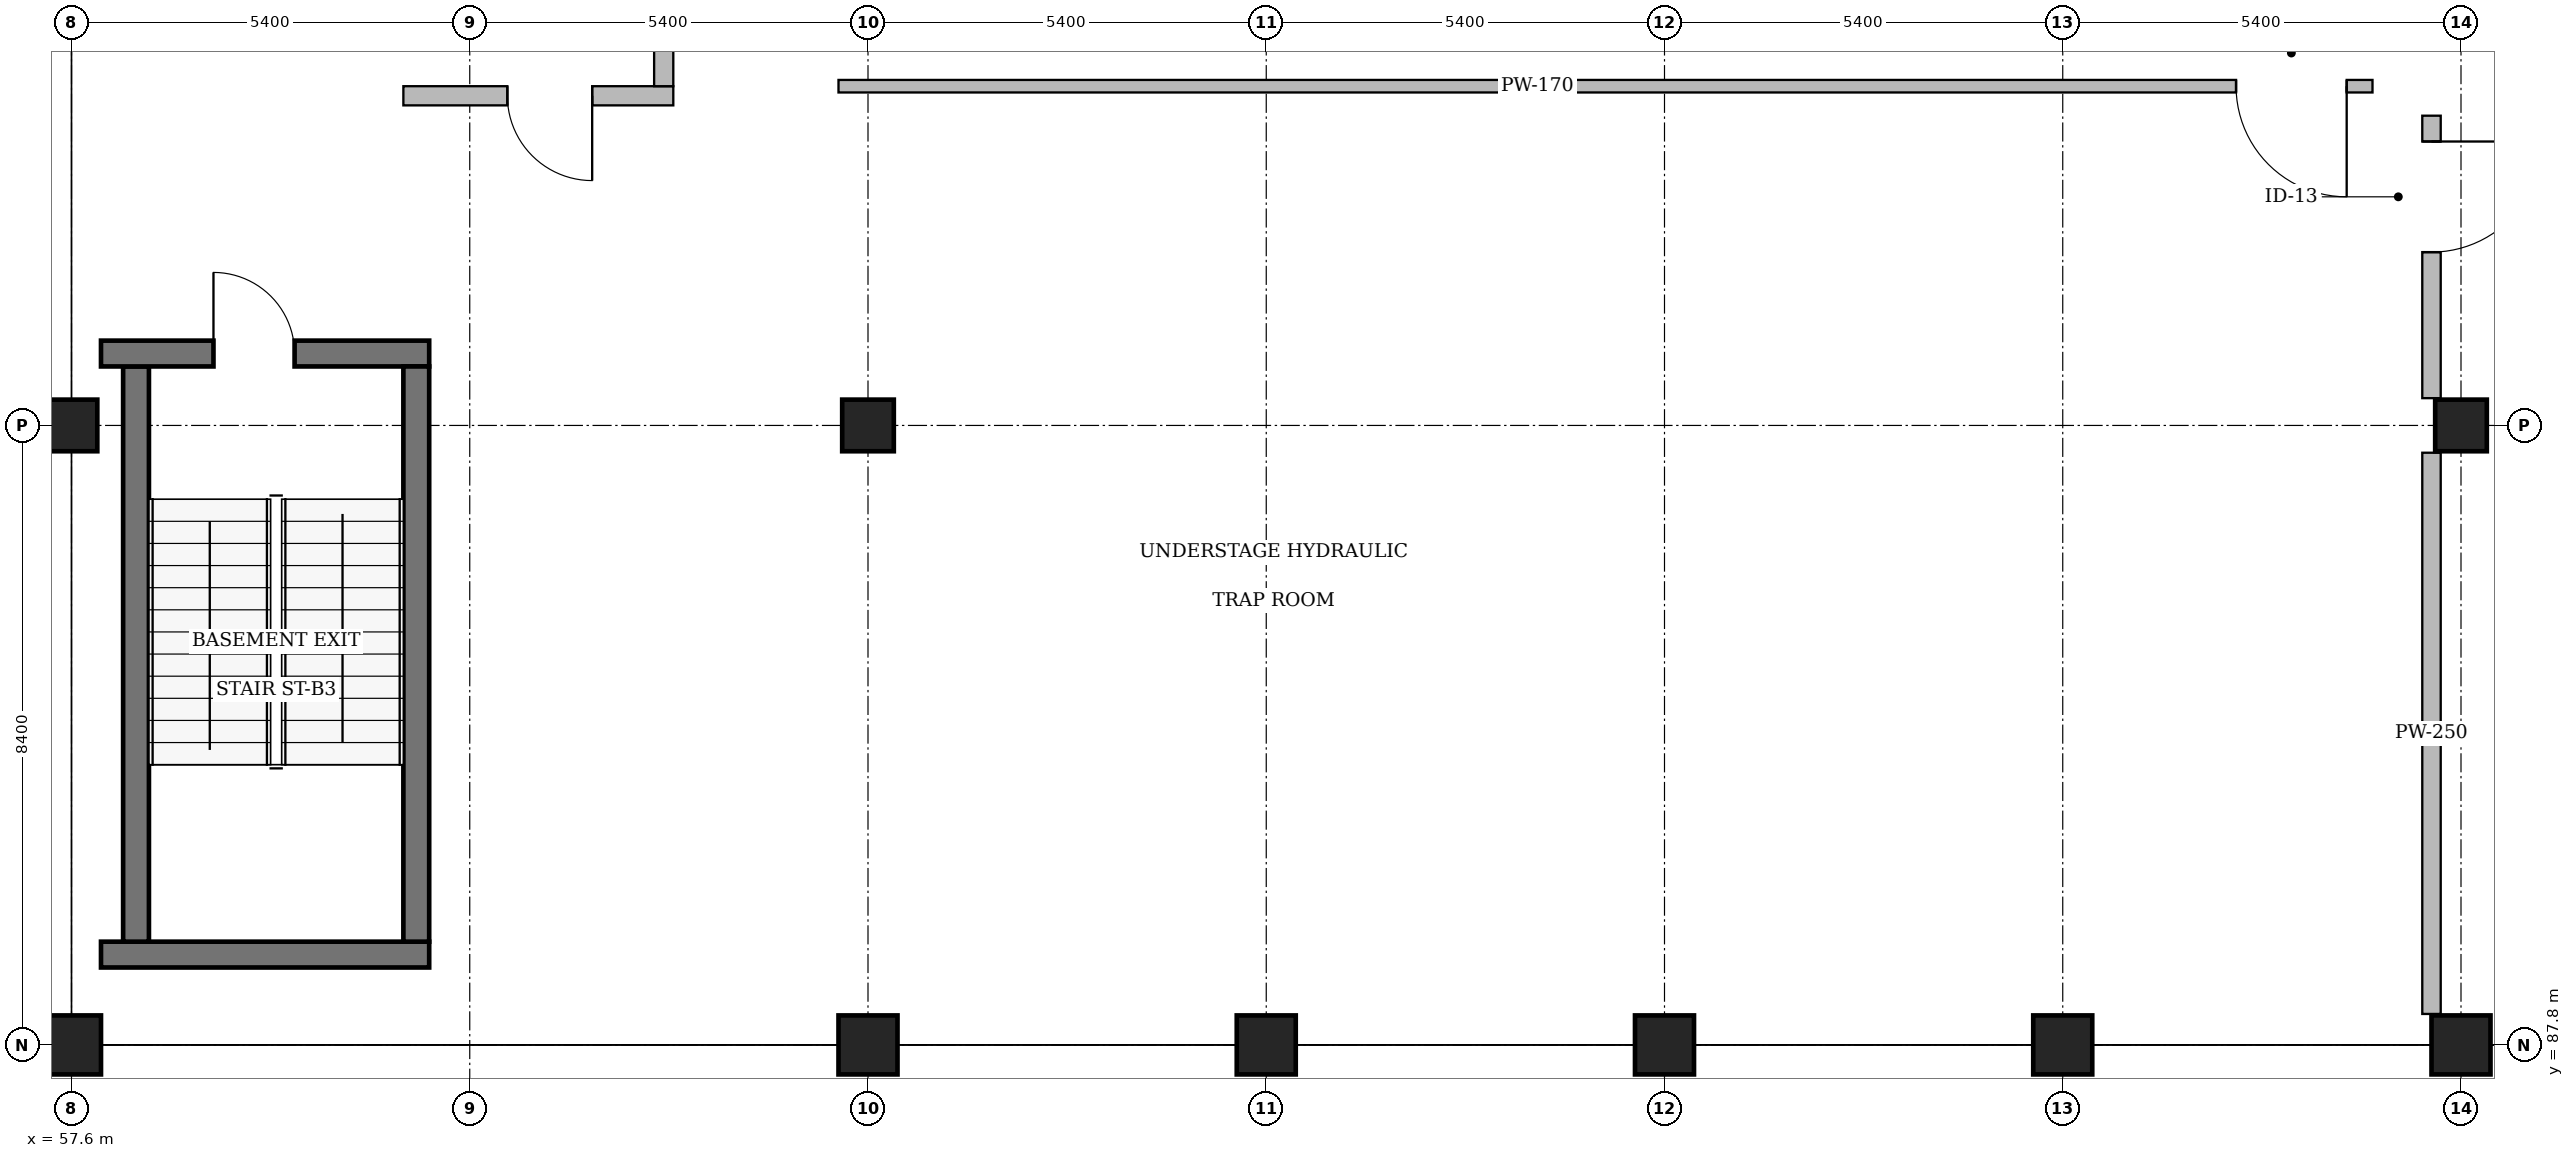
"""IFC4 building model, lengths in metres.
Left out: names, types, materials, properties, quantities, classifications, styles, units other than length and angle.
Written with IfcOpenShell. Run it as: python <this file> out.ifc"""

import sys

from ifc_helpers import new_model, si_unit, direction, frame, frame_2d, origin, origin_2d, place, context, subcontext, project, spatial, rectangle, extrude, element, fill, save


model = new_model("IFC4")
c1 = context("Model", 3, precision=1e-05, world=origin(), true_north=direction((0.0, 1.0)))
c2 = subcontext(c1, "Body", "Model", "MODEL_VIEW")
j1 = project(units=[si_unit("LENGTHUNIT", "METRE"), si_unit("PLANEANGLEUNIT", "RADIAN")], contexts=[c1])
p1 = place(None, origin())
s1 = spatial("IfcSite", under=j1, at=p1, CompositionType="ELEMENT")
p2 = place(p1, origin())
s2 = spatial("IfcBuilding", under=s1, at=p2, CompositionType="ELEMENT")
p3 = place(p2, frame((0.0, 0.0, -4.8)))
s3 = spatial("IfcBuildingStorey", under=s2, at=p3, CompositionType="ELEMENT", Elevation=-4.8)
p4 = place(p3, frame((68.4, 87.8, 0.0), z_axis=(0.0, 0.0, 1.0), x_axis=(1.0, 0.0, 0.0)))
e1 = element("IfcColumn", 1, at=p4, inside=s3, PredefinedType="COLUMN", context=c2, shape_type="SweptSolid", body=[
    extrude(rectangle(XDim=0.8, YDim=0.8, at=origin_2d()), origin(), (0.0, 0.0, 1.0), 4.8),
])
p5 = place(p3, frame((68.4, 96.2, 0.0), z_axis=(0.0, 0.0, 1.0), x_axis=(1.0, 0.0, 0.0)))
e2 = element("IfcColumn", 2, at=p5, inside=s3, PredefinedType="COLUMN", context=c2, shape_type="SweptSolid", body=[
    extrude(rectangle(XDim=0.7, YDim=0.7, at=origin_2d()), origin(), (0.0, 0.0, 1.0), 4.8),
])
for number, where, z_axis, x_axis in (
    (3, (73.8, 87.8, 0.0), (0.0, 0.0, 1.0), (1.0, 0.0, 0.0)),
    (4, (79.2, 87.8, 0.0), (0.0, 0.0, 1.0), (1.0, 0.0, 0.0)),
    (5, (84.6, 87.8, 0.0), (0.0, 0.0, 1.0), (1.0, 0.0, 0.0)),
    (6, (90.0, 87.8, 0.0), (0.0, 0.0, 1.0), (1.0, 0.0, 0.0)),
):
    element("IfcColumn", number, at=place(p3, frame(where, z_axis=z_axis, x_axis=x_axis)), inside=s3, PredefinedType="COLUMN", context=c2, shape_type="SweptSolid", body=[
        extrude(rectangle(XDim=0.8, YDim=0.8, at=origin_2d()), origin(), (0.0, 0.0, 1.0), 4.8),
    ])
p6 = place(p3, frame((90.0, 96.2, 0.0), z_axis=(0.0, 0.0, 1.0), x_axis=(1.0, 0.0, 0.0)))
e7 = element("IfcColumn", 7, at=p6, inside=s3, PredefinedType="COLUMN", context=c2, shape_type="SweptSolid", body=[
    extrude(rectangle(XDim=0.7, YDim=0.7, at=origin_2d()), origin(), (0.0, 0.0, 1.0), 4.8),
])
p7 = place(p3, frame((57.6, 87.8, 0.0), z_axis=(0.0, 0.0, 1.0), x_axis=(1.0, 0.0, 0.0)))
e8 = element("IfcColumn", 8, at=p7, inside=s3, PredefinedType="COLUMN", context=c2, shape_type="SweptSolid", body=[
    extrude(rectangle(XDim=0.8, YDim=0.8, at=origin_2d()), origin(), (0.0, 0.0, 1.0), 4.8),
])
p8 = place(p3, frame((57.6, 96.2, 0.0), z_axis=(0.0, 0.0, 1.0), x_axis=(1.0, 0.0, 0.0)))
e9 = element("IfcColumn", 9, at=p8, inside=s3, PredefinedType="COLUMN", context=c2, shape_type="SweptSolid", body=[
    extrude(rectangle(XDim=0.7, YDim=0.7, at=origin_2d()), origin(), (0.0, 0.0, 1.0), 4.8),
])
p9 = place(p3, frame((62.45, 89.025, 0.0), z_axis=(0.0, 0.0, 1.0), x_axis=(-1.0, 0.0, 0.0)))
e10 = element("IfcWall", 10, at=p9, inside=s3, PredefinedType="SOLIDWALL", context=c2, shape_type="SweptSolid", body=[
    extrude(rectangle(XDim=4.45, YDim=0.35, at=frame_2d((2.225, 0.0))), origin(), (0.0, 0.0, 1.0), 4.56),
])
p10 = place(p3, frame((58.475, 89.2, 0.0), z_axis=(0.0, 0.0, 1.0), x_axis=(0.0, 1.0, 0.0)))
e11 = element("IfcWall", 11, at=p10, inside=s3, PredefinedType="SOLIDWALL", context=c2, shape_type="SweptSolid", body=[
    extrude(rectangle(XDim=7.8, YDim=0.35, at=frame_2d((3.9, 0.0))), origin(), (0.0, 0.0, 1.0), 4.56),
])
p11 = place(p3, frame((58.0, 97.175, 0.0), z_axis=(0.0, 0.0, 1.0), x_axis=(1.0, 0.0, 0.0)))
e12 = element("IfcWall", 12, at=p11, inside=s3, PredefinedType="SOLIDWALL", context=c2, shape_type="SweptSolid", body=[
    extrude(rectangle(XDim=4.45, YDim=0.35, at=frame_2d((2.225, 0.0))), origin(), (0.0, 0.0, 1.0), 4.56),
])
p12 = place(p11, frame((1.525, 0.0, 0.0)))
e13 = element("IfcOpeningElement", 13, at=p12, cuts=e12, PredefinedType="OPENING", context=c2, shape_type="SweptSolid", body=[
    extrude(rectangle(XDim=1.1, YDim=2.15, at=frame_2d((0.55, 1.075))), frame((0.0, 0.195, 0.0), z_axis=(0.0, -1.0, 0.0), x_axis=(1.0, 0.0, 0.0)), (0.0, 0.0, 1.0), 0.39),
])
p13 = place(p3, frame((62.275, 97.0, 0.0), z_axis=(0.0, 0.0, 1.0), x_axis=(0.0, -1.0, 0.0)))
e14 = element("IfcWall", 14, at=p13, inside=s3, PredefinedType="SOLIDWALL", context=c2, shape_type="SweptSolid", body=[
    extrude(rectangle(XDim=7.8, YDim=0.35, at=frame_2d((3.9, 0.0))), origin(), (0.0, 0.0, 1.0), 4.56),
])
p14 = place(p3, frame((65.76, 100.67, 0.0), z_axis=(0.0, 0.0, 1.0), x_axis=(-1.0, 0.0, 0.0)))
e15 = element("IfcWall", 15, at=p14, inside=s3, PredefinedType="SOLIDWALL", context=c2, shape_type="SweptSolid", body=[
    extrude(rectangle(XDim=3.66, YDim=0.26, at=frame_2d((1.83, 0.0))), origin(), (0.0, 0.0, 1.0), 4.48),
])
p15 = place(p14, frame((1.1, 0.0, 0.0)))
e16 = element("IfcOpeningElement", 16, at=p15, cuts=e15, PredefinedType="OPENING", context=c2, shape_type="SweptSolid", body=[
    extrude(rectangle(XDim=1.15, YDim=2.2, at=frame_2d((0.575, 1.1))), frame((0.0, 0.15, 0.0), z_axis=(0.0, -1.0, 0.0), x_axis=(1.0, 0.0, 0.0)), (0.0, 0.0, 1.0), 0.3),
])
p16 = place(p3, frame((65.63, 106.65, 0.0), z_axis=(0.0, 0.0, 1.0), x_axis=(0.0, -1.0, 0.0)))
e17 = element("IfcWall", 17, at=p16, inside=s3, PredefinedType="SOLIDWALL", context=c2, shape_type="SweptSolid", body=[
    extrude(rectangle(XDim=5.85, YDim=0.26, at=frame_2d((2.925, 0.0))), origin(), (0.0, 0.0, 1.0), 4.48),
])
p17 = place(p3, frame((89.6, 100.4, 0.0), z_axis=(0.0, 0.0, 1.0), x_axis=(0.0, -1.0, 0.0)))
e18 = element("IfcWall", 18, at=p17, inside=s3, PredefinedType="PARTITIONING", context=c2, shape_type="SweptSolid", body=[
    extrude(rectangle(XDim=3.83, YDim=0.25, at=frame_2d((1.915, 0.0))), origin(), (0.0, 0.0, 1.0), 4.48),
])
p18 = place(p17, frame((0.35, 0.0, 0.0)))
e19 = element("IfcOpeningElement", 19, at=p18, cuts=e18, PredefinedType="OPENING", context=c2, shape_type="SweptSolid", body=[
    extrude(rectangle(XDim=1.5, YDim=2.2, at=frame_2d((0.75, 1.1))), frame((0.0, 0.145, 0.0), z_axis=(0.0, -1.0, 0.0), x_axis=(1.0, 0.0, 0.0)), (0.0, 0.0, 1.0), 0.29),
])
p19 = place(p3, frame((89.6, 95.83, 0.0), z_axis=(0.0, 0.0, 1.0), x_axis=(0.0, -1.0, 0.0)))
e20 = element("IfcWall", 20, at=p19, inside=s3, PredefinedType="PARTITIONING", context=c2, shape_type="SweptSolid", body=[
    extrude(rectangle(XDim=7.61, YDim=0.25, at=frame_2d((3.805, 0.0))), origin(), (0.0, 0.0, 1.0), 3.6),
])
p20 = place(p3, frame((88.8, 100.8, 0.0), z_axis=(0.0, 0.0, 1.0), x_axis=(-1.0, 0.0, 0.0)))
e21 = element("IfcWall", 21, at=p20, inside=s3, PredefinedType="PARTITIONING", context=c2, shape_type="SweptSolid", body=[
    extrude(rectangle(XDim=20.8, YDim=0.17, at=frame_2d((10.4, 0.0))), origin(), (0.0, 0.0, 1.0), 4.48),
])
p21 = place(p20, frame((0.35, 0.0, 0.0)))
e22 = element("IfcOpeningElement", 22, at=p21, cuts=e21, PredefinedType="OPENING", context=c2, shape_type="SweptSolid", body=[
    extrude(rectangle(XDim=1.5, YDim=2.2, at=frame_2d((0.75, 1.1))), frame((0.0, 0.105, 0.0), z_axis=(0.0, -1.0, 0.0), x_axis=(1.0, 0.0, 0.0)), (0.0, 0.0, 1.0), 0.21),
])
p22 = place(p12, origin())
e23 = element("IfcDoor", 23, at=p22, inside=s3, OperationType="SINGLE_SWING_LEFT", PredefinedType="DOOR", context=c2, shape_type="SweptSolid", body=[
    extrude(rectangle(XDim=1.1, YDim=2.15, at=frame_2d((0.55, 1.075))), frame((0.0, 0.025, 0.0), z_axis=(0.0, -1.0, 0.0), x_axis=(1.0, 0.0, 0.0)), (0.0, 0.0, 1.0), 0.05),
])
fill(e13, e23)
p23 = place(p15, origin())
e24 = element("IfcDoor", 24, at=p23, inside=s3, OperationType="SINGLE_SWING_LEFT", PredefinedType="DOOR", context=c2, shape_type="SweptSolid", body=[
    extrude(rectangle(XDim=1.15, YDim=2.2, at=frame_2d((0.575, 1.1))), frame((0.0, 0.025, 0.0), z_axis=(0.0, -1.0, 0.0), x_axis=(1.0, 0.0, 0.0)), (0.0, 0.0, 1.0), 0.05),
])
fill(e16, e24)
p24 = place(p18, origin())
e25 = element("IfcDoor", 25, at=p24, inside=s3, OperationType="DOUBLE_DOOR_SINGLE_SWING", PredefinedType="DOOR", context=c2, shape_type="SweptSolid", body=[
    extrude(rectangle(XDim=1.5, YDim=2.2, at=frame_2d((0.75, 1.1))), frame((0.0, 0.025, 0.0), z_axis=(0.0, -1.0, 0.0), x_axis=(1.0, 0.0, 0.0)), (0.0, 0.0, 1.0), 0.05),
])
fill(e19, e25)
p25 = place(p21, origin())
e26 = element("IfcDoor", 26, at=p25, inside=s3, OperationType="DOUBLE_DOOR_SINGLE_SWING", PredefinedType="DOOR", context=c2, shape_type="SweptSolid", body=[
    extrude(rectangle(XDim=1.5, YDim=2.2, at=frame_2d((0.75, 1.1))), frame((0.0, 0.025, 0.0), z_axis=(0.0, -1.0, 0.0), x_axis=(1.0, 0.0, 0.0)), (0.0, 0.0, 1.0), 0.05),
])
fill(e22, e26)
save(model, sys.argv[1])
